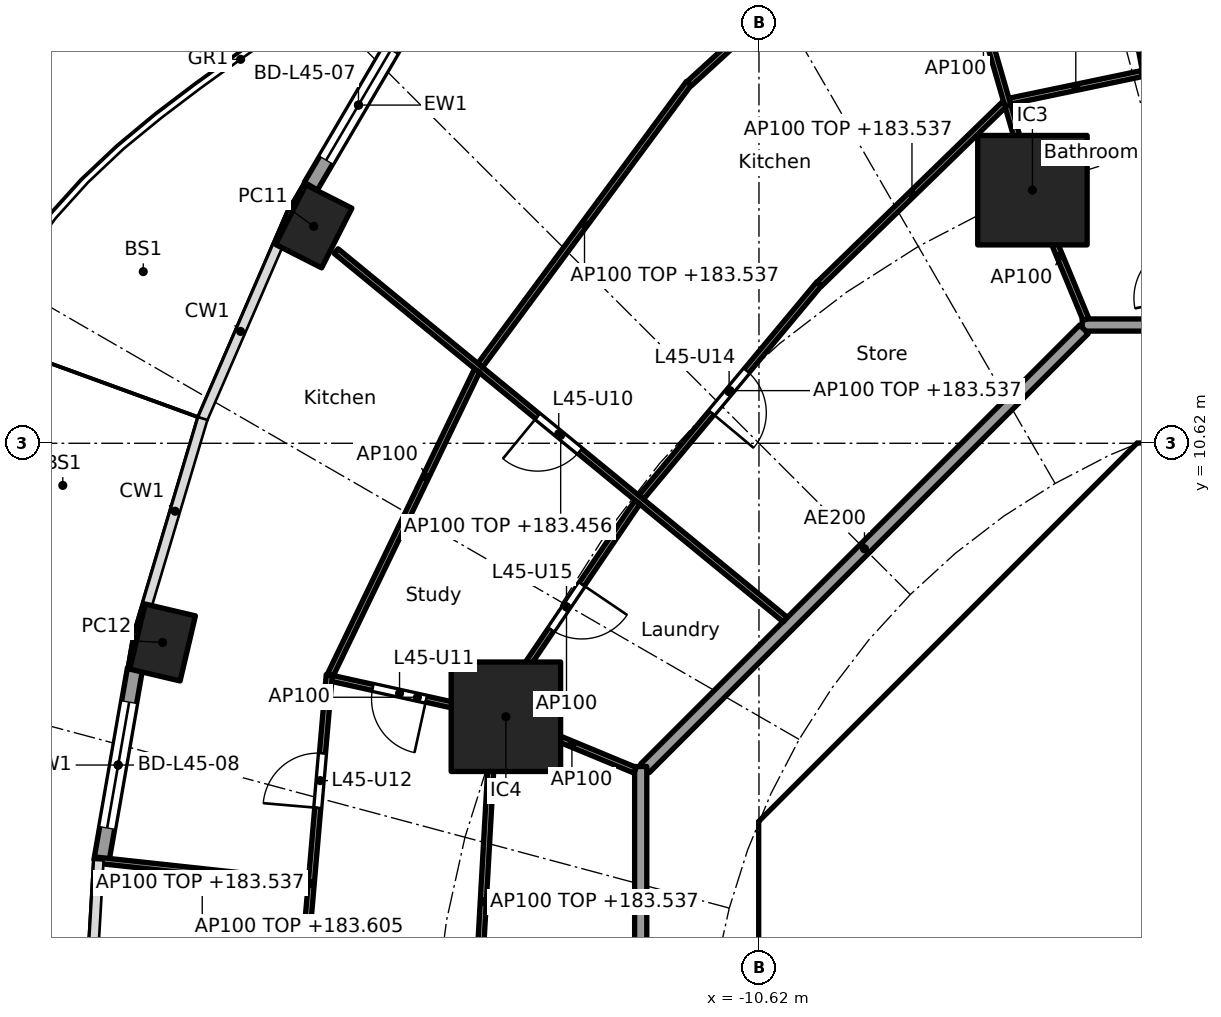
"""IFC4 building model, lengths in metres.
Left out: names, types, materials, properties, quantities, classifications, styles, units other than length and angle.
Written with IfcOpenShell. Run it as: python <this file> out.ifc"""

import sys

from ifc_helpers import new_model, si_unit, direction, frame, frame_2d, origin, origin_2d, place, context, subcontext, project, spatial, polyline, rectangle, hollow_rectangle, outline, extrude, element, fill, save


model = new_model("IFC4")
c1 = context("Model", 3, precision=1e-05, world=origin(), true_north=direction((0.0, 1.0)))
c2 = subcontext(c1, "Body", "Model", "MODEL_VIEW")
j1 = project(units=[si_unit("LENGTHUNIT", "METRE"), si_unit("PLANEANGLEUNIT", "RADIAN")], contexts=[c1])
p1 = place(None, origin())
s1 = spatial("IfcSite", under=j1, at=p1, CompositionType="ELEMENT")
p2 = place(p1, origin())
s2 = spatial("IfcBuilding", under=s1, at=p2, CompositionType="ELEMENT")
p3 = place(p2, frame((0.0, 0.0, 180.7)))
s3 = spatial("IfcBuildingStorey", under=s2, at=p3, CompositionType="ELEMENT", Elevation=180.7)
for number, where, z_axis, x_axis in (
    (1, (-17.942, 14.188, 0.0), (0.0, 0.0, 1.0), (-0.452, -0.892, 0.0)),
    (2, (-20.427, 7.344, 0.0), (0.0, 0.0, 1.0), (-0.229, -0.973, 0.0)),
):
    element("IfcColumn", number, at=place(p3, frame(where, z_axis=z_axis, x_axis=x_axis)), inside=s3, PredefinedType="COLUMN", context=c2, shape_type="SweptSolid", body=[
        extrude(hollow_rectangle(XDim=1.1, YDim=0.85, WallThickness=0.036, at=origin_2d()), origin(), (0.0, 0.0, 1.0), 3.7),
    ])
for number, where, z_axis, x_axis in (
    (3, (-6.123, 14.782, 0.0), (0.0, 0.0, 1.0), (1.0, 0.0, 0.0)),
    (4, (-14.782, 6.123, 0.0), (0.0, 0.0, 1.0), (1.0, 0.0, 0.0)),
):
    element("IfcColumn", number, at=place(p3, frame(where, z_axis=z_axis, x_axis=x_axis)), inside=s3, PredefinedType="COLUMN", context=c2, shape_type="SweptSolid", body=[
        extrude(rectangle(XDim=1.8, YDim=1.8, at=origin_2d()), origin(), (0.0, 0.0, 1.0), 3.7),
    ])
p4 = place(p3, frame((-17.989, 14.848, 0.0), z_axis=(0.0, 0.0, 1.0), x_axis=(0.506309086483, 0.862352079458, 0.0)))
e5 = element("IfcWall", 5, at=p4, inside=s3, PredefinedType="SOLIDWALL", context=c2, shape_type="SweptSolid", body=[
    extrude(rectangle(XDim=3.092, YDim=0.25, at=frame_2d((1.546, 0.0))), origin(), (0.0, 0.0, 1.0), 3.44),
])
p5 = place(p4, frame((0.496, 0.0, 0.0)))
e6 = element("IfcOpeningElement", 6, at=p5, cuts=e5, PredefinedType="OPENING", context=c2, shape_type="SweptSolid", body=[
    extrude(rectangle(XDim=2.1, YDim=2.4, at=frame_2d((1.05, 1.2))), frame((0.0, 0.135, 0.0), z_axis=(0.0, -1.0, 0.0), x_axis=(1.0, 0.0, 0.0)), (0.0, 0.0, 1.0), 0.27),
])
p6 = place(p3, frame((-21.435, 3.747, 0.0), z_axis=(0.0, 0.0, 1.0), x_axis=(0.172223552479, 0.98505789067, 0.0)))
e7 = element("IfcWall", 7, at=p6, inside=s3, PredefinedType="SOLIDWALL", context=c2, shape_type="SweptSolid", body=[
    extrude(rectangle(XDim=3.211, YDim=0.25, at=frame_2d((1.605, 0.0))), origin(), (0.0, 0.0, 1.0), 3.44),
])
p7 = place(p6, frame((0.555, 0.0, 0.0)))
e8 = element("IfcOpeningElement", 8, at=p7, cuts=e7, PredefinedType="OPENING", context=c2, shape_type="SweptSolid", body=[
    extrude(rectangle(XDim=2.1, YDim=2.4, at=frame_2d((1.05, 1.2))), frame((0.0, 0.135, 0.0), z_axis=(0.0, -1.0, 0.0), x_axis=(1.0, 0.0, 0.0)), (0.0, 0.0, 1.0), 0.27),
])
p8 = place(p3, frame((-4.613, 9.988, 0.0), z_axis=(0.0, 0.0, 1.0), x_axis=(-0.707106781187, -0.707106781187, 0.0)))
e9 = element("IfcWall", 9, at=p8, inside=s3, PredefinedType="SHEAR", context=c2, shape_type="SweptSolid", body=[
    extrude(rectangle(XDim=7.602, YDim=0.6, at=frame_2d((3.801, 0.0))), origin(), (0.0, 0.0, 1.0), 3.44),
])
p9 = place(p8, frame((0.351, 0.0, 0.0)))
e10 = element("IfcOpeningElement", 10, at=p9, cuts=e9, PredefinedType="OPENING", context=c2, shape_type="SweptSolid", body=[
    extrude(rectangle(XDim=1.1, YDim=2.1, at=frame_2d((0.55, 1.05))), frame((0.0, 0.31, 0.0), z_axis=(0.0, -1.0, 0.0), x_axis=(1.0, 0.0, 0.0)), (0.0, 0.0, 1.0), 0.62),
])
p10 = place(p3, frame((-10.325, 3.801, 0.0), z_axis=(0.0, 0.0, 1.0), x_axis=(0.0, -1.0, 0.0)))
e11 = element("IfcWall", 11, at=p10, inside=s3, PredefinedType="SHEAR", context=c2, shape_type="SweptSolid", body=[
    extrude(rectangle(XDim=7.602, YDim=0.6, at=frame_2d((3.801, 0.0))), origin(), (0.0, 0.0, 1.0), 3.44),
])
p11 = place(p10, frame((0.651, 0.0, 0.0)))
e12 = element("IfcOpeningElement", 12, at=p11, cuts=e11, PredefinedType="OPENING", context=c2, shape_type="SweptSolid", body=[
    extrude(rectangle(XDim=1.5, YDim=2.1, at=frame_2d((0.75, 1.05))), frame((0.0, 0.31, 0.0), z_axis=(0.0, -1.0, 0.0), x_axis=(1.0, 0.0, 0.0)), (0.0, 0.0, 1.0), 0.62),
])
p12 = place(p10, frame((5.451, 0.0, 0.0)))
e13 = element("IfcOpeningElement", 13, at=p12, cuts=e11, PredefinedType="OPENING", context=c2, shape_type="SweptSolid", body=[
    extrude(rectangle(XDim=1.5, YDim=2.1, at=frame_2d((0.75, 1.05))), frame((0.0, 0.31, 0.0), z_axis=(0.0, -1.0, 0.0), x_axis=(1.0, 0.0, 0.0)), (0.0, 0.0, 1.0), 0.62),
])
p13 = place(p3, frame((-5.8, 4.3, 0.0), z_axis=(0.0, 0.0, 1.0), x_axis=(0.0, 1.0, 0.0)))
e14 = element("IfcWall", 14, at=p13, inside=s3, PredefinedType="PARTITIONING", context=c2, shape_type="SweptSolid", body=[
    extrude(rectangle(XDim=3.927, YDim=0.15, at=frame_2d((1.963, 0.0))), origin(), (0.0, 0.0, 1.0), 3.44),
])
p14 = place(p13, frame((0.413, 0.0, 0.0)))
e15 = element("IfcOpeningElement", 15, at=p14, cuts=e14, PredefinedType="OPENING", context=c2, shape_type="SweptSolid", body=[
    extrude(rectangle(XDim=0.9, YDim=2.1, at=frame_2d((0.45, 1.05))), frame((0.0, 0.085, 0.0), z_axis=(0.0, -1.0, 0.0), x_axis=(1.0, 0.0, 0.0)), (0.0, 0.0, 1.0), 0.17),
])
p15 = place(p13, frame((2.489, 0.0, 0.0)))
e16 = element("IfcOpeningElement", 16, at=p15, cuts=e14, PredefinedType="OPENING", context=c2, shape_type="SweptSolid", body=[
    extrude(rectangle(XDim=0.9, YDim=2.1, at=frame_2d((0.45, 1.05))), frame((0.0, 0.085, 0.0), z_axis=(0.0, -1.0, 0.0), x_axis=(1.0, 0.0, 0.0)), (0.0, 0.0, 1.0), 0.17),
])
p16 = place(p3, origin())
e17 = element("IfcWall", 17, at=p16, inside=s3, PredefinedType="SHEAR", context=c2, shape_type="SweptSolid", body=[
    extrude(outline(polyline([(-10.2, 4.825), (-9.776, 4.401), (-10.025, 4.152), (-10.025, 3.801), (-10.625, 3.801), (-10.625, 4.401), (-10.2, 4.825)])), origin(), (0.0, 0.0, 1.0), 3.44),
])
p17 = place(p3, origin())
e18 = element("IfcWall", 18, at=p17, inside=s3, PredefinedType="SHEAR", context=c2, shape_type="SweptSolid", body=[
    extrude(outline(polyline([(-4.152, 10.025), (-4.401, 9.776), (-4.825, 10.2), (-4.401, 10.625), (4.401, 10.625), (4.825, 10.2), (4.401, 9.776), (4.152, 10.025), (-4.152, 10.025)])), origin(), (0.0, 0.0, 1.0), 3.44),
])
p18 = place(p3, frame((-10.025, 4.0, 0.0), z_axis=(0.0, 0.0, 1.0), x_axis=(1.0, 0.0, 0.0)))
e19 = element("IfcWall", 19, at=p18, inside=s3, PredefinedType="PARTITIONING", context=c2, shape_type="SweptSolid", body=[
    extrude(rectangle(XDim=3.325, YDim=0.2, at=frame_2d((1.662, 0.0))), origin(), (0.0, 0.0, 1.0), 3.44),
])
p19 = place(p3, frame((-8.001, 6.1, 0.0), z_axis=(0.0, 0.0, 1.0), x_axis=(1.0, 0.0, 0.0)))
e20 = element("IfcWall", 20, at=p19, inside=s3, PredefinedType="PARTITIONING", context=c2, shape_type="SweptSolid", body=[
    extrude(rectangle(XDim=2.126, YDim=0.15, at=frame_2d((1.063, 0.0))), origin(), (0.0, 0.0, 1.0), 3.44),
])
p20 = place(p3, origin())
e21 = element("IfcWall", 21, at=p20, inside=s3, PredefinedType="SOLIDWALL", context=c2, shape_type="SweptSolid", body=[
    extrude(outline(polyline([(-6.7, 4.3), (6.7, 4.3), (6.7, 2.1), (6.5, 2.1), (6.5, 4.1), (4.5, 4.1), (4.5, 2.1), (4.3, 2.1), (4.3, 4.1), (2.3, 4.1), (2.3, 2.1), (2.1, 2.1), (2.1, 4.1), (0.1, 4.1), (0.1, 2.1), (-0.1, 2.1), (-0.1, 4.1), (-4.3, 4.1), (-4.3, 2.1), (-4.5, 2.1), (-4.5, 4.1), (-6.5, 4.1), (-6.5, 2.1), (-6.7, 2.1), (-6.7, 4.3)])), origin(), (0.0, 0.0, 1.0), 3.44),
])
p21 = place(p3, frame((5.104, 12.565, 0.0), z_axis=(0.0, 0.0, 1.0), x_axis=(-1.0, 0.0, 0.0)))
e22 = element("IfcWall", 22, at=p21, inside=s3, PredefinedType="PARTITIONING", context=c2, shape_type="SweptSolid", body=[
    extrude(rectangle(XDim=10.409, YDim=0.2, at=frame_2d((5.205, 0.0))), origin(), (0.0, 0.0, 1.0), 3.44),
])
p22 = place(p21, frame((6.339, 0.0, 0.0)))
e23 = element("IfcOpeningElement", 23, at=p22, cuts=e22, PredefinedType="OPENING", context=c2, shape_type="SweptSolid", body=[
    extrude(rectangle(XDim=1.0, YDim=2.1, at=frame_2d((0.5, 1.05))), frame((0.0, 0.11, 0.0), z_axis=(0.0, -1.0, 0.0), x_axis=(1.0, 0.0, 0.0)), (0.0, 0.0, 1.0), 0.22),
])
p23 = place(p3, frame((-5.275, 12.494, 0.0), z_axis=(0.0, 0.0, 1.0), x_axis=(-0.707106781187, -0.707106781187, 0.0)))
e24 = element("IfcWall", 24, at=p23, inside=s3, PredefinedType="PARTITIONING", context=c2, shape_type="SweptSolid", body=[
    extrude(rectangle(XDim=10.209, YDim=0.2, at=frame_2d((5.104, 0.0))), origin(), (0.0, 0.0, 1.0), 3.44),
])
p24 = place(p3, frame((-12.565, 5.304, 0.0), z_axis=(0.0, 0.0, 1.0), x_axis=(0.0, -1.0, 0.0)))
e25 = element("IfcWall", 25, at=p24, inside=s3, PredefinedType="PARTITIONING", context=c2, shape_type="SweptSolid", body=[
    extrude(rectangle(XDim=10.409, YDim=0.2, at=frame_2d((5.205, 0.0))), origin(), (0.0, 0.0, 1.0), 3.44),
])
p25 = place(p3, frame((-3.488, 12.663, 0.0), z_axis=(0.0, 0.0, 1.0), x_axis=(-0.186783185485, 0.982401161247, 0.0)))
e26 = element("IfcWall", 26, at=p25, inside=s3, PredefinedType="PARTITIONING", context=c2, shape_type="SweptSolid", body=[
    extrude(rectangle(XDim=8.595, YDim=0.1, at=frame_2d((4.298, 0.0))), origin(), (0.0, 0.0, 1.0), 2.756),
])
p26 = place(p25, frame((0.35, 0.0, 0.0)))
e27 = element("IfcOpeningElement", 27, at=p26, cuts=e26, PredefinedType="OPENING", context=c2, shape_type="SweptSolid", body=[
    extrude(rectangle(XDim=0.9, YDim=2.1, at=frame_2d((0.45, 1.05))), frame((0.0, 0.06, 0.0), z_axis=(0.0, -1.0, 0.0), x_axis=(1.0, 0.0, 0.0)), (0.0, 0.0, 1.0), 0.12),
])
p27 = place(p25, frame((5.908, 0.0, 0.0)))
e28 = element("IfcOpeningElement", 28, at=p27, cuts=e26, PredefinedType="OPENING", context=c2, shape_type="SweptSolid", body=[
    extrude(rectangle(XDim=0.9, YDim=2.1, at=frame_2d((0.45, 1.05))), frame((0.0, 0.06, 0.0), z_axis=(0.0, -1.0, 0.0), x_axis=(1.0, 0.0, 0.0)), (0.0, 0.0, 1.0), 0.12),
])
p28 = place(p3, frame((-4.324, 16.699, 0.0), z_axis=(0.0, 0.0, 1.0), x_axis=(-0.978908011866, -0.204301503432, 0.0)))
e29 = element("IfcWall", 29, at=p28, inside=s3, PredefinedType="PARTITIONING", context=c2, shape_type="SweptSolid", body=[
    extrude(rectangle(XDim=2.218, YDim=0.1, at=frame_2d((1.109, 0.0))), origin(), (0.0, 0.0, 1.0), 2.837),
])
p29 = place(p3, frame((-5.243, 12.657, 0.0), z_axis=(0.0, 0.0, 1.0), x_axis=(-0.382719158442, 0.923864733477, 0.0)))
e30 = element("IfcWall", 30, at=p29, inside=s3, PredefinedType="PARTITIONING", context=c2, shape_type="SweptSolid", body=[
    extrude(rectangle(XDim=2.25, YDim=0.1, at=frame_2d((1.125, 0.0))), origin(), (0.0, 0.0, 1.0), 3.44),
])
p30 = place(p3, frame((-6.137, 14.83, 0.0), z_axis=(0.0, 0.0, 1.0), x_axis=(-0.278471793245, 0.960444407744, 0.0)))
e31 = element("IfcWall", 31, at=p30, inside=s3, PredefinedType="PARTITIONING", context=c2, shape_type="SweptSolid", body=[
    extrude(rectangle(XDim=5.688, YDim=0.1, at=frame_2d((2.844, 0.0))), origin(), (0.0, 0.0, 1.0), 3.44),
])
p31 = place(p3, frame((-6.58, 16.201, 0.0), z_axis=(0.0, 0.0, 1.0), x_axis=(-0.716946269374, -0.697128429223, 0.0)))
e32 = element("IfcWall", 32, at=p31, inside=s3, PredefinedType="PARTITIONING", context=c2, shape_type="SweptSolid", body=[
    extrude(rectangle(XDim=4.25, YDim=0.1, at=frame_2d((2.125, 0.0))), origin(), (0.0, 0.0, 1.0), 2.837),
])
p32 = place(p3, frame((-7.744, 20.212, 0.0), z_axis=(0.0, 0.0, 1.0), x_axis=(-0.738051761282, -0.674744097913, 0.0)))
e33 = element("IfcWall", 33, at=p32, inside=s3, PredefinedType="PARTITIONING", context=c2, shape_type="SweptSolid", body=[
    extrude(rectangle(XDim=5.449, YDim=0.1, at=frame_2d((2.725, 0.0))), origin(), (0.0, 0.0, 1.0), 2.837),
])
p33 = place(p32, frame((0.912, 0.0, 0.0)))
e34 = element("IfcOpeningElement", 34, at=p33, cuts=e33, PredefinedType="OPENING", context=c2, shape_type="SweptSolid", body=[
    extrude(rectangle(XDim=0.9, YDim=2.1, at=frame_2d((0.45, 1.05))), frame((0.0, 0.06, 0.0), z_axis=(0.0, -1.0, 0.0), x_axis=(1.0, 0.0, 0.0)), (0.0, 0.0, 1.0), 0.12),
])
p34 = place(p3, frame((-9.631, 13.242, 0.0), z_axis=(0.0, 0.0, 1.0), x_axis=(-0.640315711982, -0.768111833647, 0.0)))
e35 = element("IfcWall", 35, at=p34, inside=s3, PredefinedType="PARTITIONING", context=c2, shape_type="SweptSolid", body=[
    extrude(rectangle(XDim=4.572, YDim=0.1, at=frame_2d((2.286, 0.0))), origin(), (0.0, 0.0, 1.0), 2.837),
])
p35 = place(p34, frame((1.861, 0.0, 0.0)))
e36 = element("IfcOpeningElement", 36, at=p35, cuts=e35, PredefinedType="OPENING", context=c2, shape_type="SweptSolid", body=[
    extrude(rectangle(XDim=0.9, YDim=2.1, at=frame_2d((0.45, 1.05))), frame((0.0, 0.06, 0.0), z_axis=(0.0, -1.0, 0.0), x_axis=(1.0, 0.0, 0.0)), (0.0, 0.0, 1.0), 0.12),
])
p36 = place(p3, frame((-11.773, 16.542, 0.0), z_axis=(0.0, 0.0, 1.0), x_axis=(-0.594694305999, -0.803951915485, 0.0)))
e37 = element("IfcWall", 37, at=p36, inside=s3, PredefinedType="PARTITIONING", context=c2, shape_type="SweptSolid", body=[
    extrude(rectangle(XDim=5.772, YDim=0.1, at=frame_2d((2.886, 0.0))), origin(), (0.0, 0.0, 1.0), 2.837),
])
p37 = place(p3, frame((-10.189, 7.721, 0.0), z_axis=(0.0, 0.0, 1.0), x_axis=(-0.773134429339, 0.634242188892, 0.0)))
e38 = element("IfcWall", 38, at=p37, inside=s3, PredefinedType="PARTITIONING", context=c2, shape_type="SweptSolid", body=[
    extrude(rectangle(XDim=9.552, YDim=0.1, at=frame_2d((4.776, 0.0))), origin(), (0.0, 0.0, 1.0), 2.756),
])
p38 = place(p37, frame((4.367, 0.0, 0.0)))
e39 = element("IfcOpeningElement", 39, at=p38, cuts=e38, PredefinedType="OPENING", context=c2, shape_type="SweptSolid", body=[
    extrude(rectangle(XDim=0.9, YDim=2.1, at=frame_2d((0.45, 1.05))), frame((0.0, 0.06, 0.0), z_axis=(0.0, -1.0, 0.0), x_axis=(1.0, 0.0, 0.0)), (0.0, 0.0, 1.0), 0.12),
])
p39 = place(p3, frame((-12.619, 9.65, 0.0), z_axis=(0.0, 0.0, 1.0), x_axis=(-0.561064907171, -0.827771810308, 0.0)))
e40 = element("IfcWall", 40, at=p39, inside=s3, PredefinedType="PARTITIONING", context=c2, shape_type="SweptSolid", body=[
    extrude(rectangle(XDim=4.159, YDim=0.1, at=frame_2d((2.079, 0.0))), origin(), (0.0, 0.0, 1.0), 3.44),
])
p40 = place(p39, frame((1.629, 0.0, 0.0)))
e41 = element("IfcOpeningElement", 41, at=p40, cuts=e40, PredefinedType="OPENING", context=c2, shape_type="SweptSolid", body=[
    extrude(rectangle(XDim=0.9, YDim=2.1, at=frame_2d((0.45, 1.05))), frame((0.0, 0.06, 0.0), z_axis=(0.0, -1.0, 0.0), x_axis=(1.0, 0.0, 0.0)), (0.0, 0.0, 1.0), 0.12),
])
p41 = place(p3, frame((-15.257, 11.816, 0.0), z_axis=(0.0, 0.0, 1.0), x_axis=(-0.434040130629, -0.900893536997, 0.0)))
e42 = element("IfcWall", 42, at=p41, inside=s3, PredefinedType="PARTITIONING", context=c2, shape_type="SweptSolid", body=[
    extrude(rectangle(XDim=5.558, YDim=0.1, at=frame_2d((2.779, 0.0))), origin(), (0.0, 0.0, 1.0), 3.44),
])
p42 = place(p3, frame((-12.657, 5.243, 0.0), z_axis=(0.0, 0.0, 1.0), x_axis=(-0.923848837015, 0.382757529444, 0.0)))
e43 = element("IfcWall", 43, at=p42, inside=s3, PredefinedType="PARTITIONING", context=c2, shape_type="SweptSolid", body=[
    extrude(rectangle(XDim=2.25, YDim=0.1, at=frame_2d((1.125, 0.0))), origin(), (0.0, 0.0, 1.0), 3.44),
])
p43 = place(p3, frame((-14.831, 6.134, 0.0), z_axis=(0.0, 0.0, 1.0), x_axis=(-0.976560749847, 0.215241961191, 0.0)))
e44 = element("IfcWall", 44, at=p43, inside=s3, PredefinedType="PARTITIONING", context=c2, shape_type="SweptSolid", body=[
    extrude(rectangle(XDim=2.879, YDim=0.1, at=frame_2d((1.439, 0.0))), origin(), (0.0, 0.0, 1.0), 3.44),
])
p44 = place(p43, frame((1.291, 0.0, 0.0)))
e45 = element("IfcOpeningElement", 45, at=p44, cuts=e44, PredefinedType="OPENING", context=c2, shape_type="SweptSolid", body=[
    extrude(rectangle(XDim=0.9, YDim=2.1, at=frame_2d((0.45, 1.05))), frame((0.0, 0.06, 0.0), z_axis=(0.0, -1.0, 0.0), x_axis=(1.0, 0.0, 0.0)), (0.0, 0.0, 1.0), 0.12),
])
p45 = place(p3, frame((-14.983, 6.117, 0.0), z_axis=(0.0, 0.0, 1.0), x_axis=(-0.056328933432, -0.998412265178, 0.0)))
e46 = element("IfcWall", 46, at=p45, inside=s3, PredefinedType="PARTITIONING", context=c2, shape_type="SweptSolid", body=[
    extrude(rectangle(XDim=6.077, YDim=0.1, at=frame_2d((3.038, 0.0))), origin(), (0.0, 0.0, 1.0), 2.837),
])
p46 = place(p3, frame((-17.687, 6.814, 0.0), z_axis=(0.0, 0.0, 1.0), x_axis=(-0.086010249709, -0.996294252189, 0.0)))
e47 = element("IfcWall", 47, at=p46, inside=s3, PredefinedType="PARTITIONING", context=c2, shape_type="SweptSolid", body=[
    extrude(rectangle(XDim=6.889, YDim=0.1, at=frame_2d((3.445, 0.0))), origin(), (0.0, 0.0, 1.0), 2.837),
])
p47 = place(p46, frame((1.297, 0.0, 0.0)))
e48 = element("IfcOpeningElement", 48, at=p47, cuts=e47, PredefinedType="OPENING", context=c2, shape_type="SweptSolid", body=[
    extrude(rectangle(XDim=0.9, YDim=2.1, at=frame_2d((0.45, 1.05))), frame((0.0, 0.06, 0.0), z_axis=(0.0, -1.0, 0.0), x_axis=(1.0, 0.0, 0.0)), (0.0, 0.0, 1.0), 0.12),
])
p48 = place(p3, frame((-18.033, 3.387, 0.0), z_axis=(0.0, 0.0, 1.0), x_axis=(-0.994194772207, 0.107595329438, 0.0)))
e49 = element("IfcWall", 49, at=p48, inside=s3, PredefinedType="PARTITIONING", context=c2, shape_type="SweptSolid", body=[
    extrude(rectangle(XDim=3.506, YDim=0.1, at=frame_2d((1.753, 0.0))), origin(), (0.0, 0.0, 1.0), 2.905),
])
p49 = place(p5, origin())
e50 = element("IfcDoor", 50, at=p49, inside=s3, OperationType="SLIDING_TO_LEFT", PredefinedType="DOOR", context=c2, shape_type="SweptSolid", body=[
    extrude(rectangle(XDim=2.1, YDim=2.4, at=frame_2d((1.05, 1.2))), frame((0.0, 0.025, 0.0), z_axis=(0.0, -1.0, 0.0), x_axis=(1.0, 0.0, 0.0)), (0.0, 0.0, 1.0), 0.05),
])
fill(e6, e50)
p50 = place(p7, origin())
e51 = element("IfcDoor", 51, at=p50, inside=s3, OperationType="SLIDING_TO_LEFT", PredefinedType="DOOR", context=c2, shape_type="SweptSolid", body=[
    extrude(rectangle(XDim=2.1, YDim=2.4, at=frame_2d((1.05, 1.2))), frame((0.0, 0.025, 0.0), z_axis=(0.0, -1.0, 0.0), x_axis=(1.0, 0.0, 0.0)), (0.0, 0.0, 1.0), 0.05),
])
fill(e8, e51)
p51 = place(p14, origin())
e52 = element("IfcDoor", 52, at=p51, inside=s3, OperationType="SINGLE_SWING_RIGHT", PredefinedType="DOOR", context=c2, shape_type="SweptSolid", body=[
    extrude(rectangle(XDim=0.9, YDim=2.1, at=frame_2d((0.45, 1.05))), frame((0.0, 0.025, 0.0), z_axis=(0.0, -1.0, 0.0), x_axis=(1.0, 0.0, 0.0)), (0.0, 0.0, 1.0), 0.05),
])
fill(e15, e52)
p52 = place(p15, origin())
e53 = element("IfcDoor", 53, at=p52, inside=s3, OperationType="SINGLE_SWING_RIGHT", PredefinedType="DOOR", context=c2, shape_type="SweptSolid", body=[
    extrude(rectangle(XDim=0.9, YDim=2.1, at=frame_2d((0.45, 1.05))), frame((0.0, 0.025, 0.0), z_axis=(0.0, -1.0, 0.0), x_axis=(1.0, 0.0, 0.0)), (0.0, 0.0, 1.0), 0.05),
])
fill(e16, e53)
p53 = place(p11, origin())
e54 = element("IfcDoor", 54, at=p53, inside=s3, OperationType="DOUBLE_DOOR_SINGLE_SWING", PredefinedType="DOOR", context=c2, shape_type="SweptSolid", body=[
    extrude(rectangle(XDim=1.5, YDim=2.1, at=frame_2d((0.75, 1.05))), frame((0.0, 0.025, 0.0), z_axis=(0.0, -1.0, 0.0), x_axis=(1.0, 0.0, 0.0)), (0.0, 0.0, 1.0), 0.05),
])
fill(e12, e54)
p54 = place(p9, origin())
e55 = element("IfcDoor", 55, at=p54, inside=s3, OperationType="SINGLE_SWING_LEFT", PredefinedType="DOOR", context=c2, shape_type="SweptSolid", body=[
    extrude(rectangle(XDim=1.1, YDim=2.1, at=frame_2d((0.55, 1.05))), frame((0.0, 0.025, 0.0), z_axis=(0.0, -1.0, 0.0), x_axis=(1.0, 0.0, 0.0)), (0.0, 0.0, 1.0), 0.05),
])
fill(e10, e55)
p55 = place(p38, origin())
e56 = element("IfcDoor", 56, at=p55, inside=s3, OperationType="SINGLE_SWING_RIGHT", PredefinedType="DOOR", context=c2, shape_type="SweptSolid", body=[
    extrude(rectangle(XDim=0.9, YDim=2.1, at=frame_2d((0.45, 1.05))), frame((0.0, 0.025, 0.0), z_axis=(0.0, -1.0, 0.0), x_axis=(1.0, 0.0, 0.0)), (0.0, 0.0, 1.0), 0.05),
])
fill(e39, e56)
p56 = place(p44, origin())
e57 = element("IfcDoor", 57, at=p56, inside=s3, OperationType="SINGLE_SWING_LEFT", PredefinedType="DOOR", context=c2, shape_type="SweptSolid", body=[
    extrude(rectangle(XDim=0.9, YDim=2.1, at=frame_2d((0.45, 1.05))), frame((0.0, 0.025, 0.0), z_axis=(0.0, -1.0, 0.0), x_axis=(1.0, 0.0, 0.0)), (0.0, 0.0, 1.0), 0.05),
])
fill(e45, e57)
p57 = place(p47, frame((0.9, 0.0, 0.0), x_axis=(-1.0, 0.0, 0.0)))
e58 = element("IfcDoor", 58, at=p57, inside=s3, OperationType="SINGLE_SWING_LEFT", PredefinedType="DOOR", context=c2, shape_type="SweptSolid", body=[
    extrude(rectangle(XDim=0.9, YDim=2.1, at=frame_2d((0.45, 1.05))), frame((0.0, 0.025, 0.0), z_axis=(0.0, -1.0, 0.0), x_axis=(1.0, 0.0, 0.0)), (0.0, 0.0, 1.0), 0.05),
])
fill(e48, e58)
p58 = place(p35, origin())
e59 = element("IfcDoor", 59, at=p58, inside=s3, OperationType="SINGLE_SWING_RIGHT", PredefinedType="DOOR", context=c2, shape_type="SweptSolid", body=[
    extrude(rectangle(XDim=0.9, YDim=2.1, at=frame_2d((0.45, 1.05))), frame((0.0, 0.025, 0.0), z_axis=(0.0, -1.0, 0.0), x_axis=(1.0, 0.0, 0.0)), (0.0, 0.0, 1.0), 0.05),
])
fill(e36, e59)
p59 = place(p40, origin())
e60 = element("IfcDoor", 60, at=p59, inside=s3, OperationType="SINGLE_SWING_LEFT", PredefinedType="DOOR", context=c2, shape_type="SweptSolid", body=[
    extrude(rectangle(XDim=0.9, YDim=2.1, at=frame_2d((0.45, 1.05))), frame((0.0, 0.025, 0.0), z_axis=(0.0, -1.0, 0.0), x_axis=(1.0, 0.0, 0.0)), (0.0, 0.0, 1.0), 0.05),
])
fill(e41, e60)
save(model, sys.argv[1])
